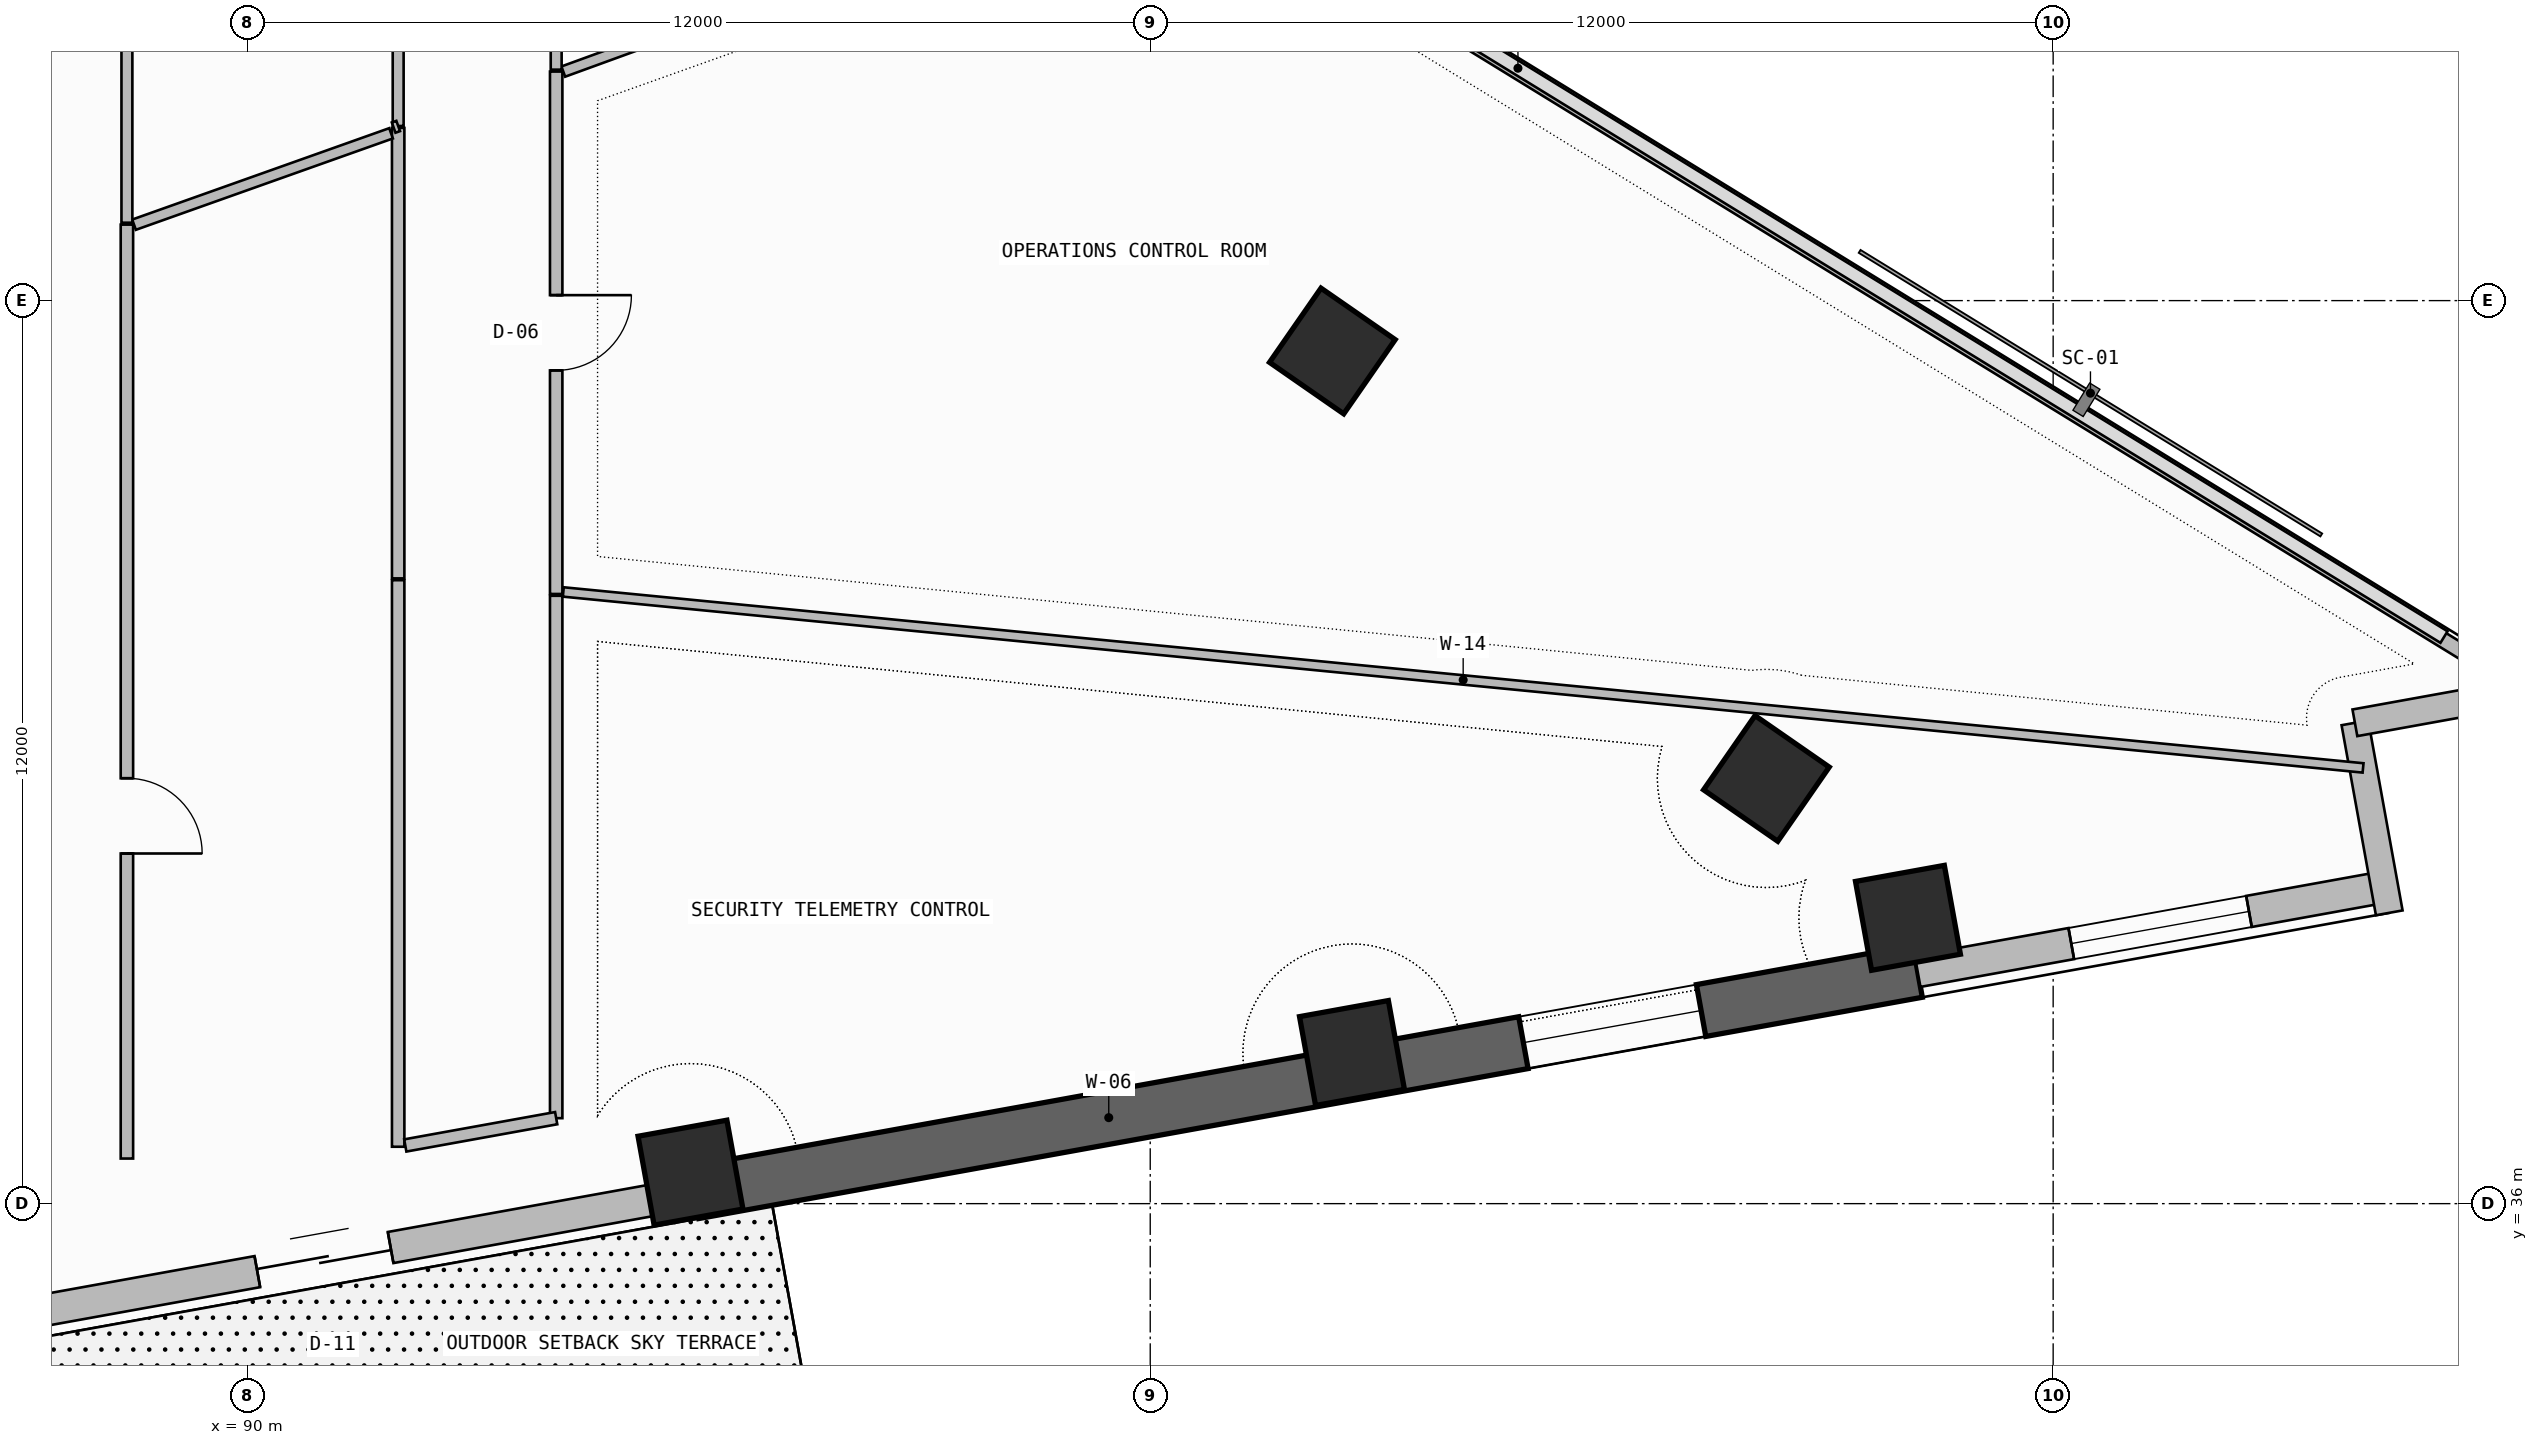
"""IFC4 building model, lengths in metres.
Left out: names, types, materials, properties, quantities, classifications, styles, units other than length and angle.
Written with IfcOpenShell. Run it as: python <this file> out.ifc"""

import sys

from ifc_helpers import new_model, si_unit, direction, frame, frame_2d, origin, origin_2d, place, context, subcontext, project, spatial, rectangle, extrude, element, fill, save


model = new_model("IFC4")
c1 = context("Model", 3, precision=1e-05, world=origin(), true_north=direction((0.0, 1.0)))
c2 = subcontext(c1, "Body", "Model", "MODEL_VIEW")
j1 = project(units=[si_unit("LENGTHUNIT", "METRE"), si_unit("PLANEANGLEUNIT", "RADIAN")], contexts=[c1])
p1 = place(None, origin())
s1 = spatial("IfcSite", under=j1, at=p1, CompositionType="ELEMENT")
p2 = place(p1, origin())
s2 = spatial("IfcBuilding", under=s1, at=p2, CompositionType="ELEMENT")
p3 = place(p2, frame((0.0, 0.0, 95.7)))
s3 = spatial("IfcBuildingStorey", under=s2, at=p3, CompositionType="ELEMENT", Elevation=95.7)
for number, where, z_axis, x_axis in (
    (1, (95.89, 36.412, -0.4), (0.0, 0.0, 1.0), (0.984, 0.178, 0.0)),
    (2, (104.681, 38.001, -0.4), (0.0, 0.0, 1.0), (0.984, 0.178, 0.0)),
):
    element("IfcColumn", number, at=place(p3, frame(where, z_axis=z_axis, x_axis=x_axis)), inside=s3, PredefinedType="COLUMN", context=c2, shape_type="SweptSolid", body=[
        extrude(rectangle(XDim=1.2, YDim=1.2, at=origin_2d()), origin(), (0.0, 0.0, 1.0), 4.0),
    ])
p4 = place(p3, frame((112.07, 39.798, 0.0), z_axis=(0.0, 0.0, 1.0), x_axis=(0.984040697646, 0.177943545474, 0.0)))
e3 = element("IfcColumn", 3, at=p4, inside=s3, PredefinedType="COLUMN", context=c2, shape_type="SweptSolid", body=[
    extrude(rectangle(XDim=1.2, YDim=1.2, at=origin_2d()), origin(), (0.0, 0.0, 1.0), 3.6),
])
for number, where, z_axis, x_axis in (
    (4, (110.189, 41.65, -0.4), (0.0, 0.0, 1.0), (0.57, 0.822, 0.0)),
    (5, (104.42, 47.331, -0.4), (0.0, 0.0, 1.0), (0.57, 0.822, 0.0)),
):
    element("IfcColumn", number, at=place(p3, frame(where, z_axis=z_axis, x_axis=x_axis)), inside=s3, PredefinedType="COLUMN", context=c2, shape_type="SweptSolid", body=[
        extrude(rectangle(XDim=1.2, YDim=1.2, at=origin_2d()), origin(), (0.0, 0.0, 1.0), 4.0),
    ])
p5 = place(p3, frame((86.1, 34.367, 0.0), z_axis=(0.0, 0.0, 1.0), x_axis=(0.9840437071, 0.177926902172, 0.0)))
e6 = element("IfcWall", 6, at=p5, inside=s3, PredefinedType="SOLIDWALL", context=c2, shape_type="SweptSolid", body=[
    extrude(rectangle(XDim=9.997, YDim=0.42, at=frame_2d((4.999, 0.0))), origin(), (0.0, 0.0, 1.0), 2.725),
])
p6 = place(p5, frame((4.099, 0.0, 0.0)))
e7 = element("IfcOpeningElement", 7, at=p6, cuts=e6, PredefinedType="OPENING", context=c2, shape_type="SweptSolid", body=[
    extrude(rectangle(XDim=1.8, YDim=2.35, at=frame_2d((0.9, 1.175))), frame((0.0, 0.22, 0.0), z_axis=(0.0, -1.0, 0.0), x_axis=(1.0, 0.0, 0.0)), (0.0, 0.0, 1.0), 0.44),
])
p7 = place(p3, frame((95.938, 36.146, -0.4), z_axis=(0.0, 0.0, 1.0), x_axis=(0.984038488288, 0.177955762952, 0.0)))
e8 = element("IfcWall", 8, at=p7, inside=s3, PredefinedType="SHEAR", context=c2, shape_type="SweptSolid", body=[
    extrude(rectangle(XDim=16.525, YDim=0.7, at=frame_2d((8.262, 0.0))), origin(), (0.0, 0.0, 1.0), 3.74),
])
p8 = place(p7, frame((11.2, 0.0, 1.2)))
e9 = element("IfcOpeningElement", 9, at=p8, cuts=e8, PredefinedType="OPENING", context=c2, shape_type="SweptSolid", body=[
    extrude(rectangle(XDim=2.4, YDim=0.9, at=frame_2d((1.2, 0.45))), frame((0.0, 0.36, 0.0), z_axis=(0.0, -1.0, 0.0), x_axis=(1.0, 0.0, 0.0)), (0.0, 0.0, 1.0), 0.72),
])
p9 = place(p3, frame((112.199, 39.087, 0.0), z_axis=(0.0, 0.0, 1.0), x_axis=(0.984042888215, 0.177931431042, 0.0)))
e10 = element("IfcWall", 10, at=p9, inside=s3, PredefinedType="SOLIDWALL", context=c2, shape_type="SweptSolid", body=[
    extrude(rectangle(XDim=6.306, YDim=0.42, at=frame_2d((3.153, 0.0))), origin(), (0.0, 0.0, 1.0), 3.34),
])
p10 = place(p9, frame((2.075, 0.0, 1.2)))
e11 = element("IfcOpeningElement", 11, at=p10, cuts=e10, PredefinedType="OPENING", context=c2, shape_type="SweptSolid", body=[
    extrude(rectangle(XDim=2.4, YDim=0.9, at=frame_2d((1.2, 0.45))), frame((0.0, 0.22, 0.0), z_axis=(0.0, -1.0, 0.0), x_axis=(1.0, 0.0, 0.0)), (0.0, 0.0, 1.0), 0.44),
])
p11 = place(p3, frame((118.467, 39.864, 0.0), z_axis=(0.0, 0.0, 1.0), x_axis=(-0.177897493713, 0.984049024048, 0.0)))
e12 = element("IfcWall", 12, at=p11, inside=s3, PredefinedType="SOLIDWALL", context=c2, shape_type="SweptSolid", body=[
    extrude(rectangle(XDim=2.566, YDim=0.36, at=frame_2d((1.283, 0.0))), origin(), (0.0, 0.0, 1.0), 3.34),
])
p12 = place(p3, frame((118.01, 42.39, 0.0), z_axis=(0.0, 0.0, 1.0), x_axis=(0.984046012923, 0.177914149102, 0.0)))
e13 = element("IfcWall", 13, at=p12, inside=s3, PredefinedType="SOLIDWALL", context=c2, shape_type="SweptSolid", body=[
    extrude(rectangle(XDim=2.566, YDim=0.36, at=frame_2d((1.283, 0.0))), origin(), (0.0, 0.0, 1.0), 3.34),
])
p13 = place(p3, frame((119.865, 43.07, 0.0), z_axis=(0.0, 0.0, 1.0), x_axis=(-0.852110824326, 0.52336138859, 0.0)))
e14 = element("IfcWall", 14, at=p13, inside=s3, PredefinedType="PARAPET", context=c2, shape_type="SweptSolid", body=[
    extrude(rectangle(XDim=33.932, YDim=0.2, at=frame_2d((16.966, 0.0))), origin(), (0.0, 0.0, 1.0), 1.15),
])
p14 = place(p3, frame((94.105, 44.102, 0.0), z_axis=(0.0, 0.0, 1.0), x_axis=(0.0, 1.0, 0.0)))
e15 = element("IfcWall", 15, at=p14, inside=s3, PredefinedType="PARTITIONING", context=c2, shape_type="SweptSolid", body=[
    extrude(rectangle(XDim=6.942, YDim=0.165, at=frame_2d((3.471, 0.0))), origin(), (0.0, 0.0, 1.0), 2.725),
])
p15 = place(p14, frame((2.971, 0.0, 0.0)))
e16 = element("IfcOpeningElement", 16, at=p15, cuts=e15, PredefinedType="OPENING", context=c2, shape_type="SweptSolid", body=[
    extrude(rectangle(XDim=1.0, YDim=2.2, at=frame_2d((0.5, 1.1))), frame((0.0, 0.093, 0.0), z_axis=(0.0, -1.0, 0.0), x_axis=(1.0, 0.0, 0.0)), (0.0, 0.0, 1.0), 0.185),
])
p16 = place(p3, frame((118.119, 41.79, 0.0), z_axis=(0.0, 0.0, 1.0), x_axis=(-0.995255314979, 0.097297780071, 0.0)))
e17 = element("IfcWall", 17, at=p16, inside=s3, PredefinedType="PARTITIONING", context=c2, shape_type="SweptSolid", body=[
    extrude(rectangle(XDim=24.033, YDim=0.125, at=frame_2d((12.017, 0.0))), origin(), (0.0, 0.0, 1.0), 2.725),
])
p17 = place(p3, frame((94.199, 51.043, 0.0), z_axis=(0.0, 0.0, 1.0), x_axis=(0.939622453011, 0.342212866206, 0.0)))
e18 = element("IfcWall", 18, at=p17, inside=s3, PredefinedType="PARTITIONING", context=c2, shape_type="SweptSolid", body=[
    extrude(rectangle(XDim=8.678, YDim=0.145, at=frame_2d((4.339, 0.0))), origin(), (0.0, 0.0, 1.0), 2.725),
])
p18 = place(p3, frame((88.4, 36.599, 0.0), z_axis=(0.0, 0.0, 1.0), x_axis=(0.0, 1.0, 0.0)))
e19 = element("IfcWall", 19, at=p18, inside=s3, PredefinedType="PARTITIONING", context=c2, shape_type="SweptSolid", body=[
    extrude(rectangle(XDim=12.411, YDim=0.165, at=frame_2d((6.205, 0.0))), origin(), (0.0, 0.0, 1.0), 2.725),
])
p19 = place(p18, frame((4.054, 0.0, 0.0)))
e20 = element("IfcOpeningElement", 20, at=p19, cuts=e19, PredefinedType="OPENING", context=c2, shape_type="SweptSolid", body=[
    extrude(rectangle(XDim=1.0, YDim=2.2, at=frame_2d((0.5, 1.1))), frame((0.0, 0.093, 0.0), z_axis=(0.0, -1.0, 0.0), x_axis=(1.0, 0.0, 0.0)), (0.0, 0.0, 1.0), 0.185),
])
p20 = place(p3, frame((92.005, 44.285, 0.0), z_axis=(0.0, 0.0, 1.0), x_axis=(0.0, -1.0, 0.0)))
e21 = element("IfcWall", 21, at=p20, inside=s3, PredefinedType="PARTITIONING", context=c2, shape_type="SweptSolid", body=[
    extrude(rectangle(XDim=7.529, YDim=0.165, at=frame_2d((3.764, 0.0))), origin(), (0.0, 0.0, 1.0), 2.725),
])
p21 = place(p3, frame((94.105, 37.136, 0.0), z_axis=(0.0, 0.0, 1.0), x_axis=(0.0, 1.0, 0.0)))
e22 = element("IfcWall", 22, at=p21, inside=s3, PredefinedType="PARTITIONING", context=c2, shape_type="SweptSolid", body=[
    extrude(rectangle(XDim=6.942, YDim=0.165, at=frame_2d((3.471, 0.0))), origin(), (0.0, 0.0, 1.0), 2.725),
])
p22 = place(p3, frame((92.005, 50.295, 0.0), z_axis=(0.0, 0.0, 1.0), x_axis=(0.0, -1.0, 0.0)))
e23 = element("IfcWall", 23, at=p22, inside=s3, PredefinedType="PARTITIONING", context=c2, shape_type="SweptSolid", body=[
    extrude(rectangle(XDim=5.986, YDim=0.165, at=frame_2d((2.993, 0.0))), origin(), (0.0, 0.0, 1.0), 2.725),
])
p23 = place(p3, frame((92.1, 36.773, 0.0), z_axis=(0.0, 0.0, 1.0), x_axis=(0.984047685875, 0.17790489573, 0.0)))
e24 = element("IfcWall", 24, at=p23, inside=s3, PredefinedType="PARTITIONING", context=c2, shape_type="SweptSolid", body=[
    extrude(rectangle(XDim=2.038, YDim=0.165, at=frame_2d((1.019, 0.0))), origin(), (0.0, 0.0, 1.0), 3.34),
])
p24 = place(p3, frame((88.494, 49.009, 0.0), z_axis=(0.0, 0.0, 1.0), x_axis=(0.942234527784, 0.334953869439, 0.0)))
e25 = element("IfcWall", 25, at=p24, inside=s3, PredefinedType="PARTITIONING", context=c2, shape_type="SweptSolid", body=[
    extrude(rectangle(XDim=3.625, YDim=0.145, at=frame_2d((1.813, 0.0))), origin(), (0.0, 0.0, 1.0), 3.34),
])
p25 = place(p3, frame((88.4, 49.035, 0.0), z_axis=(0.0, 0.0, 1.0), x_axis=(0.0, 1.0, 0.0)))
e26 = element("IfcWall", 26, at=p25, inside=s3, PredefinedType="PARTITIONING", context=c2, shape_type="SweptSolid", body=[
    extrude(rectangle(XDim=7.315, YDim=0.145, at=frame_2d((3.657, 0.0))), origin(), (0.0, 0.0, 1.0), 2.725),
])
p26 = place(p25, frame((3.182, 0.0, 0.0)))
e27 = element("IfcOpeningElement", 27, at=p26, cuts=e26, PredefinedType="OPENING", context=c2, shape_type="SweptSolid", body=[
    extrude(rectangle(XDim=0.95, YDim=2.15, at=frame_2d((0.475, 1.075))), frame((0.0, 0.083, 0.0), z_axis=(0.0, -1.0, 0.0), x_axis=(1.0, 0.0, 0.0)), (0.0, 0.0, 1.0), 0.165),
])
p27 = place(p3, frame((92.005, 56.35, 0.0), z_axis=(0.0, 0.0, 1.0), x_axis=(0.0, -1.0, 0.0)))
e28 = element("IfcWall", 28, at=p27, inside=s3, PredefinedType="PARTITIONING", context=c2, shape_type="SweptSolid", body=[
    extrude(rectangle(XDim=6.03, YDim=0.145, at=frame_2d((3.015, 0.0))), origin(), (0.0, 0.0, 1.0), 2.725),
])
p28 = place(p3, frame((92.005, 50.32, 0.0), z_axis=(0.0, 0.0, 1.0), x_axis=(-0.94234951348, -0.334630235399, 0.0)))
e29 = element("IfcWall", 29, at=p28, inside=s3, PredefinedType="PARTITIONING", context=c2, shape_type="SweptSolid", body=[
    extrude(rectangle(XDim=0.063, YDim=0.145, at=frame_2d((0.032, 0.0))), origin(), (0.0, 0.0, 1.0), 3.34),
])
p29 = place(p3, frame((94.105, 51.069, 0.0), z_axis=(0.0, 0.0, 1.0), x_axis=(0.0, 1.0, 0.0)))
e30 = element("IfcWall", 30, at=p29, inside=s3, PredefinedType="PARTITIONING", context=c2, shape_type="SweptSolid", body=[
    extrude(rectangle(XDim=7.424, YDim=0.145, at=frame_2d((3.712, 0.0))), origin(), (0.0, 0.0, 1.0), 2.725),
])
p30 = place(p29, frame((3.262, 0.0, 0.0)))
e31 = element("IfcOpeningElement", 31, at=p30, cuts=e30, PredefinedType="OPENING", context=c2, shape_type="SweptSolid", body=[
    extrude(rectangle(XDim=0.9, YDim=2.1, at=frame_2d((0.45, 1.05))), frame((0.0, 0.083, 0.0), z_axis=(0.0, -1.0, 0.0), x_axis=(1.0, 0.0, 0.0)), (0.0, 0.0, 1.0), 0.165),
])
p31 = place(p6, origin())
e32 = element("IfcDoor", 32, at=p31, inside=s3, OperationType="DOUBLE_DOOR_SLIDING", PredefinedType="DOOR", context=c2, shape_type="SweptSolid", body=[
    extrude(rectangle(XDim=1.8, YDim=2.35, at=frame_2d((0.9, 1.175))), frame((0.0, 0.025, 0.0), z_axis=(0.0, -1.0, 0.0), x_axis=(1.0, 0.0, 0.0)), (0.0, 0.0, 1.0), 0.05),
])
fill(e7, e32)
p32 = place(p8, origin())
e33 = element("IfcWindow", 33, at=p32, inside=s3, PartitioningType="SINGLE_PANEL", PredefinedType="WINDOW", context=c2, shape_type="SweptSolid", body=[
    extrude(rectangle(XDim=2.4, YDim=0.9, at=frame_2d((1.2, 0.45))), frame((0.0, 0.03, 0.0), z_axis=(0.0, -1.0, 0.0), x_axis=(1.0, 0.0, 0.0)), (0.0, 0.0, 1.0), 0.06),
])
fill(e9, e33)
p33 = place(p10, origin())
e34 = element("IfcWindow", 34, at=p33, inside=s3, PartitioningType="SINGLE_PANEL", PredefinedType="WINDOW", context=c2, shape_type="SweptSolid", body=[
    extrude(rectangle(XDim=2.4, YDim=0.9, at=frame_2d((1.2, 0.45))), frame((0.0, 0.03, 0.0), z_axis=(0.0, -1.0, 0.0), x_axis=(1.0, 0.0, 0.0)), (0.0, 0.0, 1.0), 0.06),
])
fill(e11, e34)
p34 = place(p15, frame((1.0, 0.0, 0.0), z_axis=(0.0, 0.0, 1.0), x_axis=(-1.0, 0.0, 0.0)))
e35 = element("IfcDoor", 35, at=p34, inside=s3, OperationType="SINGLE_SWING_LEFT", PredefinedType="DOOR", context=c2, shape_type="SweptSolid", body=[
    extrude(rectangle(XDim=1.0, YDim=2.2, at=frame_2d((0.5, 1.1))), frame((0.0, 0.025, 0.0), z_axis=(0.0, -1.0, 0.0), x_axis=(1.0, 0.0, 0.0)), (0.0, 0.0, 1.0), 0.05),
])
fill(e16, e35)
p35 = place(p19, frame((1.0, 0.0, 0.0), z_axis=(0.0, 0.0, 1.0), x_axis=(-1.0, 0.0, 0.0)))
e36 = element("IfcDoor", 36, at=p35, inside=s3, OperationType="SINGLE_SWING_RIGHT", PredefinedType="DOOR", context=c2, shape_type="SweptSolid", body=[
    extrude(rectangle(XDim=1.0, YDim=2.2, at=frame_2d((0.5, 1.1))), frame((0.0, 0.025, 0.0), z_axis=(0.0, -1.0, 0.0), x_axis=(1.0, 0.0, 0.0)), (0.0, 0.0, 1.0), 0.05),
])
fill(e20, e36)
save(model, sys.argv[1])
